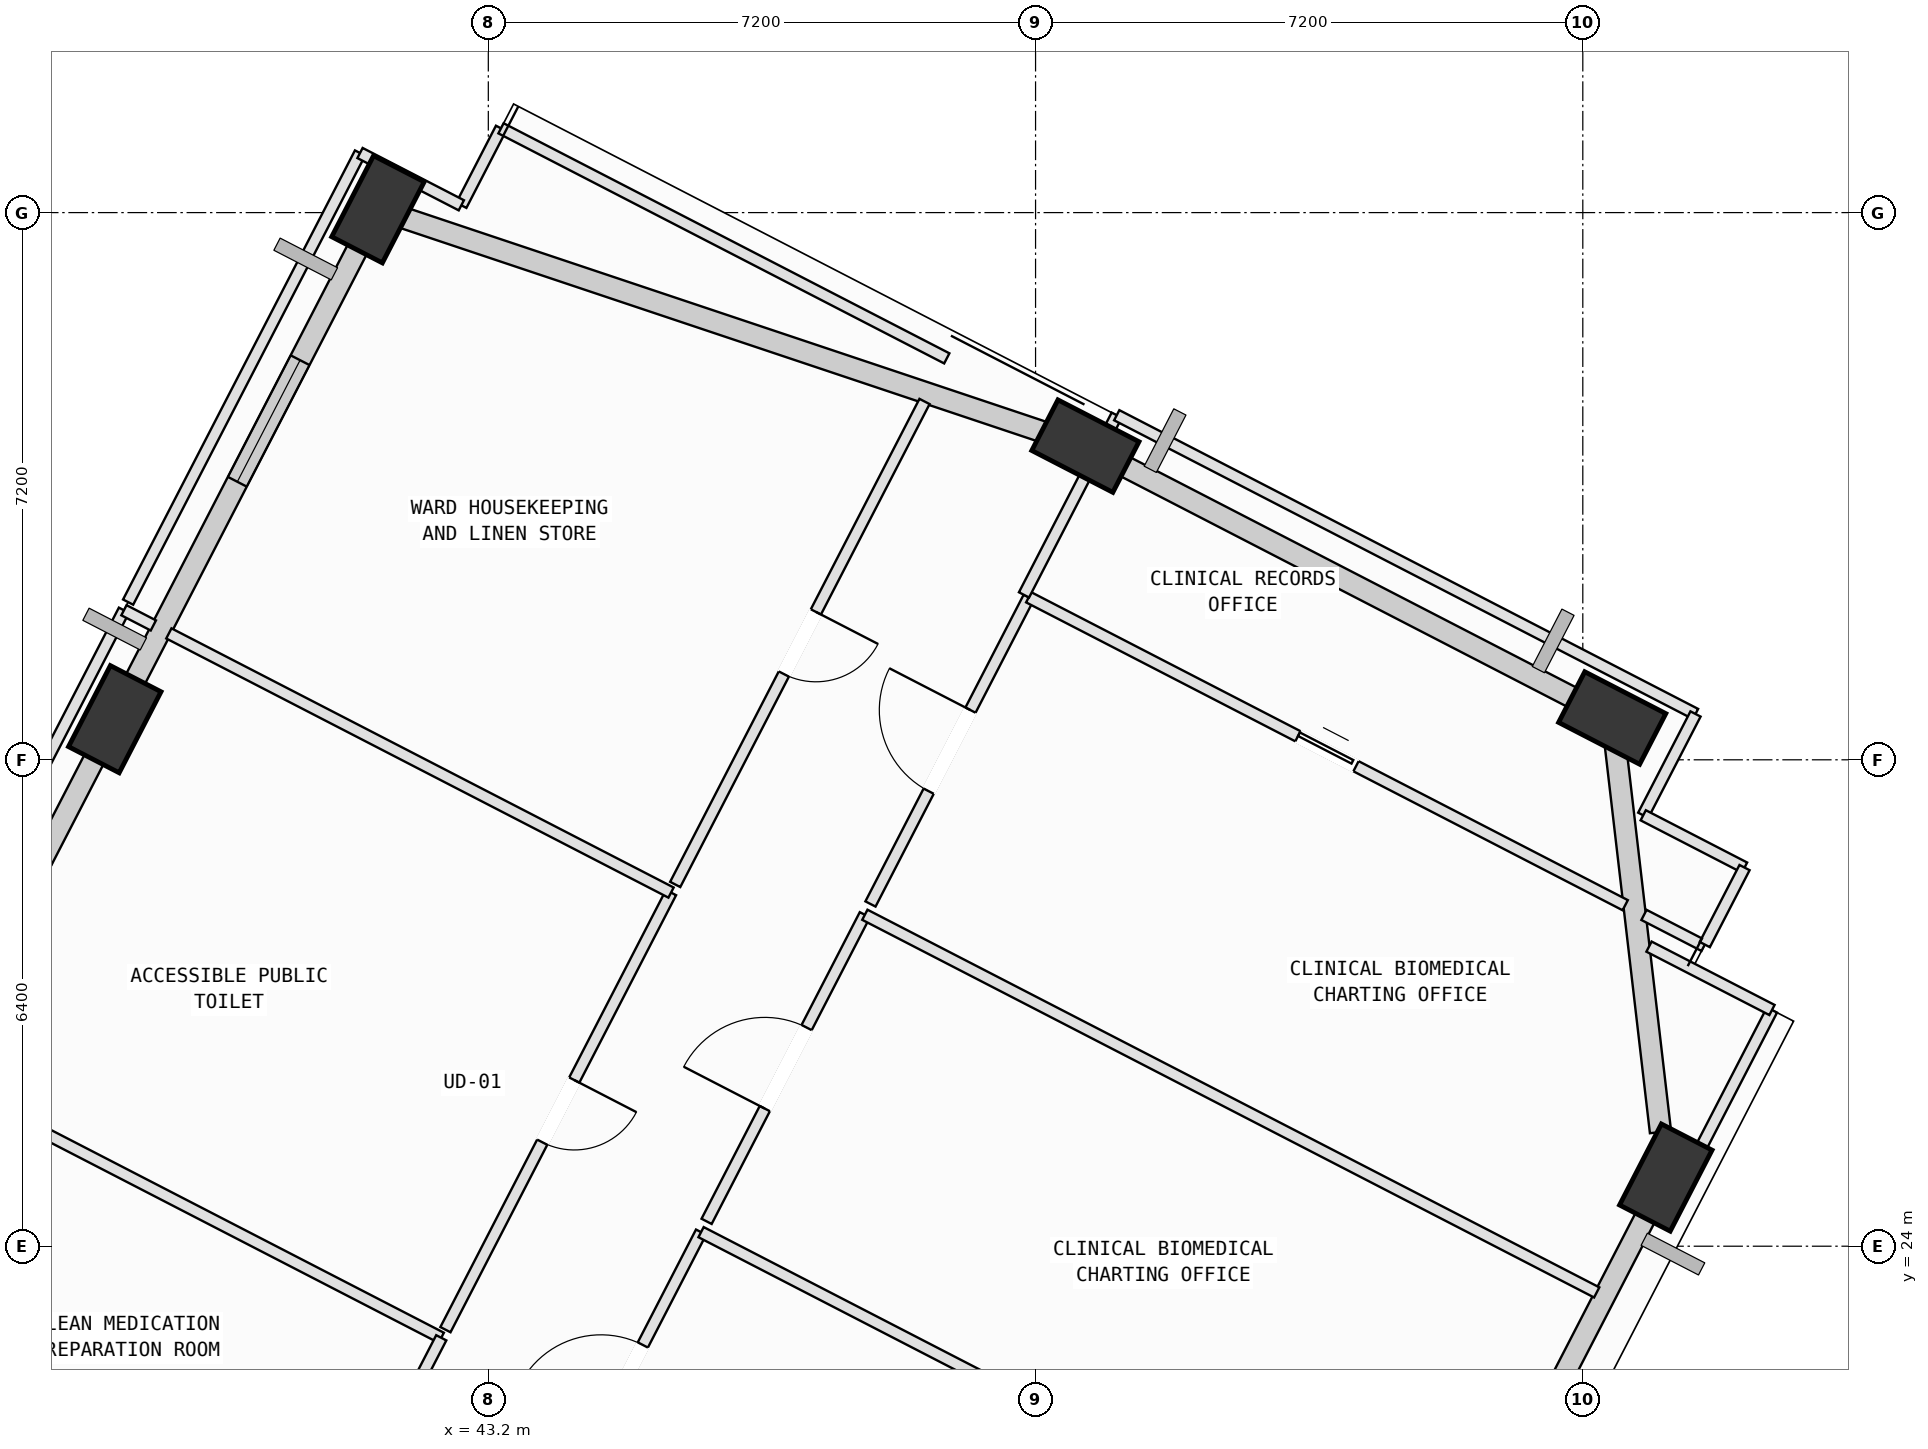
"""IFC4 building model, lengths in metres.
Left out: names, types, materials, properties, quantities, classifications, styles, units other than length and angle.
Written with IfcOpenShell. Run it as: python <this file> out.ifc"""

import sys

from ifc_helpers import new_model, si_unit, direction, frame, frame_2d, origin, origin_2d, place, context, subcontext, project, spatial, rectangle, extrude, element, fill, save


model = new_model("IFC4")
c1 = context("Model", 3, precision=1e-05, world=origin(), true_north=direction((0.0, 1.0)))
c2 = subcontext(c1, "Body", "Model", "MODEL_VIEW")
j1 = project(units=[si_unit("LENGTHUNIT", "METRE"), si_unit("PLANEANGLEUNIT", "RADIAN")], contexts=[c1])
p1 = place(None, origin())
s1 = spatial("IfcSite", under=j1, at=p1, CompositionType="ELEMENT")
p2 = place(p1, origin())
s2 = spatial("IfcBuilding", under=s1, at=p2, CompositionType="ELEMENT")
p3 = place(p2, frame((0.0, 0.0, 292.6)))
s3 = spatial("IfcBuildingStorey", under=s2, at=p3, CompositionType="ELEMENT", Elevation=292.6)
p4 = place(p3, frame((58.692, 24.903, 0.002), z_axis=(-0.001276024564, 0.103479515869, 0.994630766444), x_axis=(-0.447716651487, -0.88943410931, 0.091960671909)))
e1 = element("IfcColumn", 1, at=p4, inside=s3, PredefinedType="COLUMN", context=c2, shape_type="SweptSolid", body=[
    extrude(rectangle(XDim=1.2, YDim=0.75, at=origin_2d()), origin(), (0.0, 0.0, 1.0), 4.018),
])
p5 = place(p3, frame((57.987, 30.95, 0.002), z_axis=(-0.026188357565, 0.100317815175, 0.994610730832), x_axis=(0.975028094834, -0.216930765464, 0.047552679006)))
e2 = element("IfcColumn", 2, at=p5, inside=s3, PredefinedType="COLUMN", context=c2, shape_type="SweptSolid", body=[
    extrude(rectangle(XDim=1.2, YDim=0.75, at=origin_2d()), origin(), (0.0, 0.0, 1.0), 4.018),
])
p6 = place(p3, frame((51.056, 34.528, 0.002), z_axis=(-0.040791289145, 0.071780492391, 0.996585988082), x_axis=(0.998414705966, 0.041643578843, 0.037866703741)))
e3 = element("IfcColumn", 3, at=p6, inside=s3, PredefinedType="COLUMN", context=c2, shape_type="SweptSolid", body=[
    extrude(rectangle(XDim=1.2, YDim=0.75, at=origin_2d()), origin(), (0.0, 0.0, 1.0), 4.01),
])
p7 = place(p3, frame((41.748, 37.644, 0.002), z_axis=(-0.053409812667, 0.033228707652, 0.998019661579), x_axis=(0.510733836593, -0.857919887717, 0.055896461584)))
e4 = element("IfcColumn", 4, at=p7, inside=s3, PredefinedType="COLUMN", context=c2, shape_type="SweptSolid", body=[
    extrude(rectangle(XDim=1.2, YDim=0.75, at=origin_2d()), origin(), (0.0, 0.0, 1.0), 4.004),
])
p8 = place(p3, frame((38.285, 30.934, 0.002), z_axis=(-0.025584050071, 0.019233832393, 0.999487626774), x_axis=(0.434309594516, -0.900314501729, 0.028442469799)))
e5 = element("IfcColumn", 5, at=p8, inside=s3, PredefinedType="COLUMN", context=c2, shape_type="SweptSolid", body=[
    extrude(rectangle(XDim=1.2, YDim=0.75, at=origin_2d()), origin(), (0.0, 0.0, 1.0), 3.998),
])
p9 = place(p3, frame((58.6, 24.724, 0.0), z_axis=(0.0, 0.0, 1.0), x_axis=(-0.458648733121, -0.888617656592, 0.0)))
e6 = element("IfcWall", 6, at=p9, inside=s3, PredefinedType="SOLIDWALL", context=c2, shape_type="SweptSolid", body=[
    extrude(rectangle(XDim=6.418, YDim=0.28, at=frame_2d((3.209, 0.0))), origin(), (0.0, 0.0, 1.0), 3.265),
])
p10 = place(p9, frame((3.228, 0.0, 0.75)))
e7 = element("IfcOpeningElement", 7, at=p10, cuts=e6, PredefinedType="OPENING", context=c2, shape_type="SweptSolid", body=[
    extrude(rectangle(XDim=1.2, YDim=1.75, at=frame_2d((0.6, 0.875))), frame((0.0, 0.15, 0.0), z_axis=(0.0, -1.0, 0.0), x_axis=(1.0, 0.0, 0.0)), (0.0, 0.0, 1.0), 0.3),
])
p11 = place(p3, frame((58.009, 30.761, 0.0), z_axis=(0.0, 0.0, 1.0), x_axis=(0.115795015277, -0.993273131841, 0.0)))
e8 = element("IfcWall", 8, at=p11, inside=s3, PredefinedType="SOLIDWALL", context=c2, shape_type="SweptSolid", body=[
    extrude(rectangle(XDim=5.294, YDim=0.28, at=frame_2d((2.647, 0.0))), origin(), (0.0, 0.0, 1.0), 3.265),
])
p12 = place(p3, frame((51.276, 34.414, 0.0), z_axis=(0.0, 0.0, 1.0), x_axis=(0.888608813348, -0.458665866226, 0.0)))
e9 = element("IfcWall", 9, at=p12, inside=s3, PredefinedType="SOLIDWALL", context=c2, shape_type="SweptSolid", body=[
    extrude(rectangle(XDim=7.046, YDim=0.28, at=frame_2d((3.523, 0.0))), origin(), (0.0, 0.0, 1.0), 3.265),
])
p13 = place(p3, frame((42.008, 37.556, 0.0), z_axis=(0.0, 0.0, 1.0), x_axis=(0.948271827041, -0.317459512443, 0.0)))
e10 = element("IfcWall", 10, at=p13, inside=s3, PredefinedType="SOLIDWALL", context=c2, shape_type="SweptSolid", body=[
    extrude(rectangle(XDim=9.036, YDim=0.28, at=frame_2d((4.518, 0.0))), origin(), (0.0, 0.0, 1.0), 3.265),
])
p14 = place(p3, frame((38.47, 31.292, 0.0), z_axis=(0.0, 0.0, 1.0), x_axis=(0.458656678591, 0.888613555593, 0.0)))
e11 = element("IfcWall", 11, at=p14, inside=s3, PredefinedType="SOLIDWALL", context=c2, shape_type="SweptSolid", body=[
    extrude(rectangle(XDim=6.78, YDim=0.28, at=frame_2d((3.39, 0.0))), origin(), (0.0, 0.0, 1.0), 3.265),
])
p15 = place(p14, frame((3.113, 0.0, 0.75)))
e12 = element("IfcOpeningElement", 12, at=p15, cuts=e11, PredefinedType="OPENING", context=c2, shape_type="SweptSolid", body=[
    extrude(rectangle(XDim=1.8, YDim=2.05, at=frame_2d((0.9, 1.025))), frame((0.0, 0.15, 0.0), z_axis=(0.0, -1.0, 0.0), x_axis=(1.0, 0.0, 0.0)), (0.0, 0.0, 1.0), 0.3),
])
p16 = place(p3, frame((35.17, 24.899, 0.0), z_axis=(0.0, 0.0, 1.0), x_axis=(0.458649711601, 0.888617151561, 0.0)))
e13 = element("IfcWall", 13, at=p16, inside=s3, PredefinedType="SOLIDWALL", context=c2, shape_type="SweptSolid", body=[
    extrude(rectangle(XDim=6.409, YDim=0.28, at=frame_2d((3.205, 0.0))), origin(), (0.0, 0.0, 1.0), 3.265),
])
p17 = place(p16, frame((3.533, 0.0, 0.75)))
e14 = element("IfcOpeningElement", 14, at=p17, cuts=e13, PredefinedType="OPENING", context=c2, shape_type="SweptSolid", body=[
    extrude(rectangle(XDim=1.2, YDim=1.75, at=frame_2d((0.6, 0.875))), frame((0.0, 0.15, 0.0), z_axis=(0.0, -1.0, 0.0), x_axis=(1.0, 0.0, 0.0)), (0.0, 0.0, 1.0), 0.3),
])
p18 = place(p3, frame((43.917, 20.15, 0.0), z_axis=(0.0, 0.0, 1.0), x_axis=(0.458533348006, 0.888677201669, 0.0)))
e15 = element("IfcWall", 15, at=p18, inside=s3, PredefinedType="PARTITIONING", context=c2, shape_type="SweptSolid", body=[
    extrude(rectangle(XDim=4.541, YDim=0.15, at=frame_2d((2.27, 0.0))), origin(), (0.0, 0.0, 1.0), 3.78),
])
p19 = place(p18, frame((1.67, 0.0, 0.0)))
e16 = element("IfcOpeningElement", 16, at=p19, cuts=e15, PredefinedType="OPENING", context=c2, shape_type="SweptSolid", body=[
    extrude(rectangle(XDim=1.2, YDim=2.15, at=frame_2d((0.6, 1.075))), frame((0.0, 0.085, 0.0), z_axis=(0.0, -1.0, 0.0), x_axis=(1.0, 0.0, 0.0)), (0.0, 0.0, 1.0), 0.17),
])
p20 = place(p3, frame((45.999, 24.185, 0.0), z_axis=(0.0, 0.0, 1.0), x_axis=(0.888593697923, -0.458695149321, 0.0)))
e17 = element("IfcWall", 17, at=p20, inside=s3, PredefinedType="PARTITIONING", context=c2, shape_type="SweptSolid", body=[
    extrude(rectangle(XDim=10.835, YDim=0.15, at=frame_2d((5.417, 0.0))), origin(), (0.0, 0.0, 1.0), 3.78),
])
p21 = place(p3, frame((46.072, 24.327, 0.0), z_axis=(0.0, 0.0, 1.0), x_axis=(0.458621001786, 0.888631969221, 0.0)))
e18 = element("IfcWall", 18, at=p21, inside=s3, PredefinedType="PARTITIONING", context=c2, shape_type="SweptSolid", body=[
    extrude(rectangle(XDim=4.54, YDim=0.15, at=frame_2d((2.27, 0.0))), origin(), (0.0, 0.0, 1.0), 3.78),
])
p22 = place(p21, frame((1.67, 0.0, 0.0)))
e19 = element("IfcOpeningElement", 19, at=p22, cuts=e18, PredefinedType="OPENING", context=c2, shape_type="SweptSolid", body=[
    extrude(rectangle(XDim=1.2, YDim=2.15, at=frame_2d((0.6, 1.075))), frame((0.0, 0.085, 0.0), z_axis=(0.0, -1.0, 0.0), x_axis=(1.0, 0.0, 0.0)), (0.0, 0.0, 1.0), 0.17),
])
p23 = place(p3, frame((48.154, 28.361, 0.0), z_axis=(0.0, 0.0, 1.0), x_axis=(0.888649389218, -0.458587246926, 0.0)))
e20 = element("IfcWall", 20, at=p23, inside=s3, PredefinedType="PARTITIONING", context=c2, shape_type="SweptSolid", body=[
    extrude(rectangle(XDim=10.835, YDim=0.15, at=frame_2d((5.418, 0.0))), origin(), (0.0, 0.0, 1.0), 3.78),
])
p24 = place(p3, frame((60.089, 27.108, 0.0), z_axis=(0.0, 0.0, 1.0), x_axis=(-0.45864291977, -0.888620657055, 0.0)))
e21 = element("IfcWall", 21, at=p24, inside=s3, PredefinedType="PARTITIONING", context=c2, shape_type="SweptSolid", body=[
    extrude(rectangle(XDim=2.802, YDim=0.15, at=frame_2d((1.401, 0.0))), origin(), (0.0, 0.0, 1.0), 3.265),
])
p25 = place(p3, frame((48.228, 28.503, 0.0), z_axis=(0.0, 0.0, 1.0), x_axis=(0.458533348006, 0.888677201669, 0.0)))
e22 = element("IfcWall", 22, at=p25, inside=s3, PredefinedType="PARTITIONING", context=c2, shape_type="SweptSolid", body=[
    extrude(rectangle(XDim=4.541, YDim=0.15, at=frame_2d((2.27, 0.0))), origin(), (0.0, 0.0, 1.0), 3.78),
])
p26 = place(p25, frame((1.67, 0.0, 0.0)))
e23 = element("IfcOpeningElement", 23, at=p26, cuts=e22, PredefinedType="OPENING", context=c2, shape_type="SweptSolid", body=[
    extrude(rectangle(XDim=1.2, YDim=2.15, at=frame_2d((0.6, 1.075))), frame((0.0, 0.085, 0.0), z_axis=(0.0, -1.0, 0.0), x_axis=(1.0, 0.0, 0.0)), (0.0, 0.0, 1.0), 0.17),
])
p27 = place(p3, frame((50.31, 32.538, 0.0), z_axis=(0.0, 0.0, 1.0), x_axis=(0.888597759836, -0.458687280415, 0.0)))
e24 = element("IfcWall", 24, at=p27, inside=s3, PredefinedType="PARTITIONING", context=c2, shape_type="SweptSolid", body=[
    extrude(rectangle(XDim=8.832, YDim=0.15, at=frame_2d((4.416, 0.0))), origin(), (0.0, 0.0, 1.0), 3.78),
])
p28 = place(p27, frame((3.986, 0.0, 0.0)))
e25 = element("IfcOpeningElement", 25, at=p28, cuts=e24, PredefinedType="OPENING", context=c2, shape_type="SweptSolid", body=[
    extrude(rectangle(XDim=0.86, YDim=2.06, at=frame_2d((0.43, 1.03))), frame((0.0, 0.085, 0.0), z_axis=(0.0, -1.0, 0.0), x_axis=(1.0, 0.0, 0.0)), (0.0, 0.0, 1.0), 0.17),
])
p29 = place(p3, frame((58.405, 28.359, 0.0), z_axis=(0.0, 0.0, 1.0), x_axis=(0.888761263452, -0.458370392354, 0.0)))
e26 = element("IfcWall", 26, at=p29, inside=s3, PredefinedType="PARTITIONING", context=c2, shape_type="SweptSolid", body=[
    extrude(rectangle(XDim=0.89, YDim=0.15, at=frame_2d((0.445, 0.0))), origin(), (0.0, 0.0, 1.0), 3.78),
])
p30 = place(p3, frame((58.471, 27.942, 0.0), z_axis=(0.0, 0.0, 1.0), x_axis=(0.88888850719, -0.458123587894, 0.0)))
e27 = element("IfcWall", 27, at=p30, inside=s3, PredefinedType="PARTITIONING", context=c2, shape_type="SweptSolid", body=[
    extrude(rectangle(XDim=1.821, YDim=0.15, at=frame_2d((0.91, 0.0))), origin(), (0.0, 0.0, 1.0), 3.78),
])
p31 = place(p3, frame((35.974, 26.205, 0.0), z_axis=(0.0, 0.0, 1.0), x_axis=(0.888613749746, -0.458656302433, 0.0)))
e28 = element("IfcWall", 28, at=p31, inside=s3, PredefinedType="PARTITIONING", context=c2, shape_type="SweptSolid", body=[
    extrude(rectangle(XDim=7.435, YDim=0.15, at=frame_2d((3.718, 0.0))), origin(), (0.0, 0.0, 1.0), 3.78),
])
p32 = place(p3, frame((42.581, 22.795, 0.0), z_axis=(0.0, 0.0, 1.0), x_axis=(-0.45865608207, -0.888613863486, 0.0)))
e29 = element("IfcWall", 29, at=p32, inside=s3, PredefinedType="PARTITIONING", context=c2, shape_type="SweptSolid", body=[
    extrude(rectangle(XDim=6.142, YDim=0.15, at=frame_2d((3.071, 0.0))), origin(), (0.0, 0.0, 1.0), 3.78),
])
p33 = place(p3, frame((45.604, 28.653, 0.0), z_axis=(0.0, 0.0, 1.0), x_axis=(-0.458615052494, -0.888635039612, 0.0)))
e30 = element("IfcWall", 30, at=p33, inside=s3, PredefinedType="PARTITIONING", context=c2, shape_type="SweptSolid", body=[
    extrude(rectangle(XDim=6.472, YDim=0.15, at=frame_2d((3.236, 0.0))), origin(), (0.0, 0.0, 1.0), 3.78),
])
p34 = place(p33, frame((2.776, 0.0, 0.0)))
e31 = element("IfcOpeningElement", 31, at=p34, cuts=e30, PredefinedType="OPENING", context=c2, shape_type="SweptSolid", body=[
    extrude(rectangle(XDim=0.92, YDim=2.1, at=frame_2d((0.46, 1.05))), frame((0.0, 0.085, 0.0), z_axis=(0.0, -1.0, 0.0), x_axis=(1.0, 0.0, 0.0)), (0.0, 0.0, 1.0), 0.17),
])
p35 = place(p3, frame((35.438, 26.617, 0.0), z_axis=(0.0, 0.0, 1.0), x_axis=(0.458615052494, 0.888635039612, 0.0)))
e32 = element("IfcWall", 32, at=p35, inside=s3, PredefinedType="PARTITIONING", context=c2, shape_type="SweptSolid", body=[
    extrude(rectangle(XDim=6.472, YDim=0.15, at=frame_2d((3.236, 0.0))), origin(), (0.0, 0.0, 1.0), 3.265),
])
p36 = place(p3, frame((38.406, 32.368, 0.0), z_axis=(0.0, 0.0, 1.0), x_axis=(0.888406857878, -0.459056918992, 0.0)))
e33 = element("IfcWall", 33, at=p36, inside=s3, PredefinedType="PARTITIONING", context=c2, shape_type="SweptSolid", body=[
    extrude(rectangle(XDim=0.436, YDim=0.15, at=frame_2d((0.218, 0.0))), origin(), (0.0, 0.0, 1.0), 3.78),
])
p37 = place(p3, frame((38.997, 32.063, 0.0), z_axis=(0.0, 0.0, 1.0), x_axis=(0.888627132571, -0.45863037324, 0.0)))
e34 = element("IfcWall", 34, at=p37, inside=s3, PredefinedType="PARTITIONING", context=c2, shape_type="SweptSolid", body=[
    extrude(rectangle(XDim=7.435, YDim=0.15, at=frame_2d((3.718, 0.0))), origin(), (0.0, 0.0, 1.0), 3.78),
])
p38 = place(p3, frame((42.845, 37.696, 0.0), z_axis=(0.0, 0.0, 1.0), x_axis=(0.458064332717, 0.888919044173, 0.0)))
e35 = element("IfcWall", 35, at=p38, inside=s3, PredefinedType="PARTITIONING", context=c2, shape_type="SweptSolid", body=[
    extrude(rectangle(XDim=1.139, YDim=0.15, at=frame_2d((0.57, 0.0))), origin(), (0.0, 0.0, 1.0), 3.78),
])
p39 = place(p3, frame((43.367, 38.709, 0.0), z_axis=(0.0, 0.0, 1.0), x_axis=(0.888620170739, -0.458643862007, 0.0)))
e36 = element("IfcWall", 36, at=p39, inside=s3, PredefinedType="PARTITIONING", context=c2, shape_type="SweptSolid", body=[
    extrude(rectangle(XDim=6.6, YDim=0.15, at=frame_2d((3.3, 0.0))), origin(), (0.0, 0.0, 1.0), 3.265),
])
p40 = place(p3, frame((48.939, 35.115, 0.0), z_axis=(0.0, 0.0, 1.0), x_axis=(-0.458647267692, -0.888618412953, 0.0)))
e37 = element("IfcWall", 37, at=p40, inside=s3, PredefinedType="PARTITIONING", context=c2, shape_type="SweptSolid", body=[
    extrude(rectangle(XDim=7.152, YDim=0.15, at=frame_2d((3.576, 0.0))), origin(), (0.0, 0.0, 1.0), 3.78),
])
p41 = place(p40, frame((3.116, 0.0, 0.0)))
e38 = element("IfcOpeningElement", 38, at=p41, cuts=e37, PredefinedType="OPENING", context=c2, shape_type="SweptSolid", body=[
    extrude(rectangle(XDim=0.92, YDim=2.1, at=frame_2d((0.46, 1.05))), frame((0.0, 0.085, 0.0), z_axis=(0.0, -1.0, 0.0), x_axis=(1.0, 0.0, 0.0)), (0.0, 0.0, 1.0), 0.17),
])
p42 = place(p3, frame((38.461, 32.475, 0.0), z_axis=(0.0, 0.0, 1.0), x_axis=(0.458791602038, 0.888543902066, 0.0)))
e39 = element("IfcWall", 39, at=p42, inside=s3, PredefinedType="PARTITIONING", context=c2, shape_type="SweptSolid", body=[
    extrude(rectangle(XDim=6.65, YDim=0.15, at=frame_2d((3.325, 0.0))), origin(), (0.0, 0.0, 1.0), 3.265),
])
p43 = place(p3, frame((41.512, 38.384, 0.0), z_axis=(0.0, 0.0, 1.0), x_axis=(0.88862493644, -0.458634628368, 0.0)))
e40 = element("IfcWall", 40, at=p43, inside=s3, PredefinedType="PARTITIONING", context=c2, shape_type="SweptSolid", body=[
    extrude(rectangle(XDim=1.5, YDim=0.15, at=frame_2d((0.75, 0.0))), origin(), (0.0, 0.0, 1.0), 3.265),
])
p44 = place(p3, frame((50.248, 32.57, 0.0), z_axis=(0.0, 0.0, 1.0), x_axis=(0.458504205915, 0.888692237593, 0.0)))
e41 = element("IfcWall", 41, at=p44, inside=s3, PredefinedType="PARTITIONING", context=c2, shape_type="SweptSolid", body=[
    extrude(rectangle(XDim=2.018, YDim=0.15, at=frame_2d((1.009, 0.0))), origin(), (0.0, 0.0, 1.0), 3.78),
])
p45 = place(p3, frame((51.258, 34.527, 0.0), z_axis=(0.0, 0.0, 1.0), x_axis=(0.458479954592, 0.888704749192, 0.0)))
e42 = element("IfcWall", 42, at=p45, inside=s3, PredefinedType="PARTITIONING", context=c2, shape_type="SweptSolid", body=[
    extrude(rectangle(XDim=0.458, YDim=0.15, at=frame_2d((0.229, 0.0))), origin(), (0.0, 0.0, 1.0), 3.78),
])
p46 = place(p3, frame((51.468, 34.934, 0.0), z_axis=(0.0, 0.0, 1.0), x_axis=(0.888580952586, -0.458719839009, 0.0)))
e43 = element("IfcWall", 43, at=p46, inside=s3, PredefinedType="PARTITIONING", context=c2, shape_type="SweptSolid", body=[
    extrude(rectangle(XDim=8.57, YDim=0.15, at=frame_2d((4.285, 0.0))), origin(), (0.0, 0.0, 1.0), 3.265),
])
for number, where, z_axis, x_axis in (
    (44, (59.083, 31.003, 0.0), (0.0, 0.0, 1.0), (-0.459, -0.889, 0.0)),
    (45, (58.395, 29.67, 0.0), (0.0, 0.0, 1.0), (0.889, -0.459, 0.0)),
):
    element("IfcWall", number, at=place(p3, frame(where, z_axis=z_axis, x_axis=x_axis)), inside=s3, PredefinedType="PARTITIONING", context=c2, shape_type="SweptSolid", body=[
        extrude(rectangle(XDim=1.5, YDim=0.15, at=frame_2d((0.75, 0.0))), origin(), (0.0, 0.0, 1.0), 3.78),
    ])
p47 = place(p3, frame((59.728, 28.982, 0.0), z_axis=(0.0, 0.0, 1.0), x_axis=(-0.458741112522, -0.888569970054, 0.0)))
e46 = element("IfcWall", 46, at=p47, inside=s3, PredefinedType="PARTITIONING", context=c2, shape_type="SweptSolid", body=[
    extrude(rectangle(XDim=1.14, YDim=0.15, at=frame_2d((0.57, 0.0))), origin(), (0.0, 0.0, 1.0), 3.78),
])
p48 = place(p15, origin())
e47 = element("IfcWindow", 47, at=p48, inside=s3, PartitioningType="SINGLE_PANEL", PredefinedType="WINDOW", context=c2, shape_type="SweptSolid", body=[
    extrude(rectangle(XDim=1.8, YDim=2.05, at=frame_2d((0.9, 1.025))), frame((0.0, 0.03, 0.0), z_axis=(0.0, -1.0, 0.0), x_axis=(1.0, 0.0, 0.0)), (0.0, 0.0, 1.0), 0.06),
])
fill(e12, e47)
p49 = place(p19, origin())
e48 = element("IfcDoor", 48, at=p49, inside=s3, OperationType="SINGLE_SWING_LEFT", PredefinedType="DOOR", context=c2, shape_type="SweptSolid", body=[
    extrude(rectangle(XDim=1.2, YDim=2.15, at=frame_2d((0.6, 1.075))), frame((0.0, 0.025, 0.0), z_axis=(0.0, -1.0, 0.0), x_axis=(1.0, 0.0, 0.0)), (0.0, 0.0, 1.0), 0.05),
])
fill(e16, e48)
p50 = place(p22, origin())
e49 = element("IfcDoor", 49, at=p50, inside=s3, OperationType="SINGLE_SWING_LEFT", PredefinedType="DOOR", context=c2, shape_type="SweptSolid", body=[
    extrude(rectangle(XDim=1.2, YDim=2.15, at=frame_2d((0.6, 1.075))), frame((0.0, 0.025, 0.0), z_axis=(0.0, -1.0, 0.0), x_axis=(1.0, 0.0, 0.0)), (0.0, 0.0, 1.0), 0.05),
])
fill(e19, e49)
p51 = place(p26, origin())
e50 = element("IfcDoor", 50, at=p51, inside=s3, OperationType="SINGLE_SWING_RIGHT", PredefinedType="DOOR", context=c2, shape_type="SweptSolid", body=[
    extrude(rectangle(XDim=1.2, YDim=2.15, at=frame_2d((0.6, 1.075))), frame((0.0, 0.025, 0.0), z_axis=(0.0, -1.0, 0.0), x_axis=(1.0, 0.0, 0.0)), (0.0, 0.0, 1.0), 0.05),
])
fill(e23, e50)
p52 = place(p34, origin())
e51 = element("IfcDoor", 51, at=p52, inside=s3, OperationType="SINGLE_SWING_LEFT", PredefinedType="DOOR", context=c2, shape_type="SweptSolid", body=[
    extrude(rectangle(XDim=0.92, YDim=2.1, at=frame_2d((0.46, 1.05))), frame((0.0, 0.025, 0.0), z_axis=(0.0, -1.0, 0.0), x_axis=(1.0, 0.0, 0.0)), (0.0, 0.0, 1.0), 0.05),
])
fill(e31, e51)
p53 = place(p41, origin())
e52 = element("IfcDoor", 52, at=p53, inside=s3, OperationType="SINGLE_SWING_LEFT", PredefinedType="DOOR", context=c2, shape_type="SweptSolid", body=[
    extrude(rectangle(XDim=0.92, YDim=2.1, at=frame_2d((0.46, 1.05))), frame((0.0, 0.025, 0.0), z_axis=(0.0, -1.0, 0.0), x_axis=(1.0, 0.0, 0.0)), (0.0, 0.0, 1.0), 0.05),
])
fill(e38, e52)
p54 = place(p28, origin())
e53 = element("IfcDoor", 53, at=p54, inside=s3, OperationType="SLIDING_TO_LEFT", PredefinedType="DOOR", context=c2, shape_type="SweptSolid", body=[
    extrude(rectangle(XDim=0.86, YDim=2.06, at=frame_2d((0.43, 1.03))), frame((0.0, 0.025, 0.0), z_axis=(0.0, -1.0, 0.0), x_axis=(1.0, 0.0, 0.0)), (0.0, 0.0, 1.0), 0.05),
])
fill(e25, e53)
save(model, sys.argv[1])
